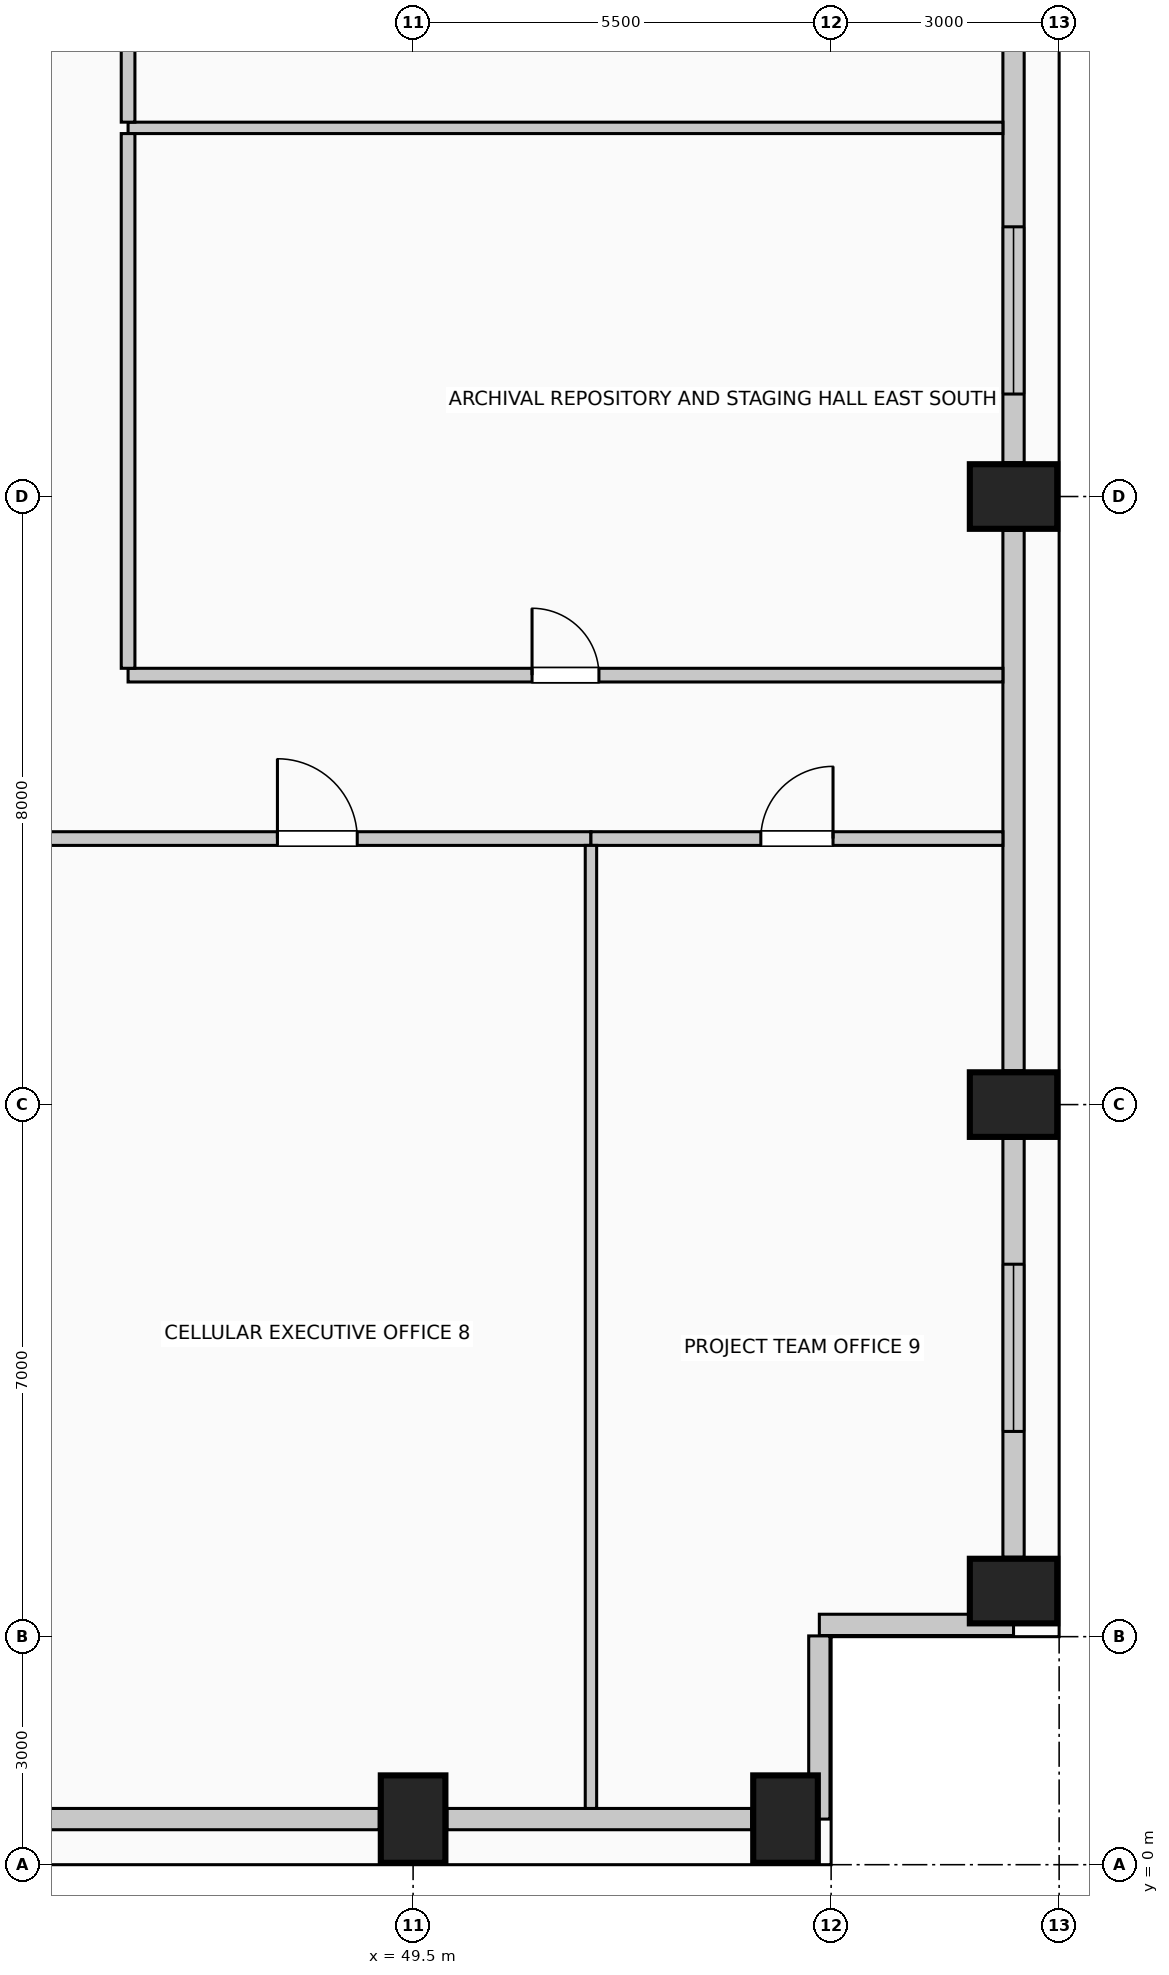
"""IFC4 building model, lengths in metres.
Left out: names, types, materials, properties, quantities, classifications, styles, units other than length and angle.
Written with IfcOpenShell. Run it as: python <this file> out.ifc"""

import sys

from ifc_helpers import new_model, si_unit, direction, frame, frame_2d, origin, origin_2d, place, context, subcontext, project, spatial, rectangle, extrude, element, fill, save


model = new_model("IFC4")
c1 = context("Model", 3, precision=1e-05, world=origin(), true_north=direction((0.0, 1.0)))
c2 = subcontext(c1, "Body", "Model", "MODEL_VIEW")
j1 = project(units=[si_unit("LENGTHUNIT", "METRE"), si_unit("PLANEANGLEUNIT", "RADIAN")], contexts=[c1])
p1 = place(None, origin())
s1 = spatial("IfcSite", under=j1, at=p1, CompositionType="ELEMENT")
p2 = place(p1, origin())
s2 = spatial("IfcBuilding", under=s1, at=p2, CompositionType="ELEMENT")
p3 = place(p2, frame((0.0, 0.0, 148.6)))
s3 = spatial("IfcBuildingStorey", under=s2, at=p3, CompositionType="ELEMENT", Elevation=148.6)
for number, where, z_axis, x_axis in (
    (1, (49.5, 0.6, 0.0), (0.0, 0.0, 1.0), (1.0, 0.0, 0.0)),
    (2, (54.4, 0.6, 0.0), (0.0, 0.0, 1.0), (1.0, 0.0, 0.0)),
    (3, (57.4, 3.6, 0.0), (0.0, 0.0, 1.0), (0.0, 1.0, 0.0)),
    (4, (57.4, 10.0, 0.0), (0.0, 0.0, 1.0), (0.0, 1.0, 0.0)),
    (5, (57.4, 18.0, 0.0), (0.0, 0.0, 1.0), (0.0, 1.0, 0.0)),
):
    element("IfcColumn", number, at=place(p3, frame(where, z_axis=z_axis, x_axis=x_axis)), inside=s3, PredefinedType="COLUMN", context=c2, shape_type="SweptSolid", body=[
        extrude(rectangle(XDim=0.85, YDim=1.15, at=origin_2d()), origin(), (0.0, 0.0, 1.0), 4.0),
    ])
p4 = place(p3, frame((49.055, 0.6, 0.0), z_axis=(0.0, 0.0, 1.0), x_axis=(-1.0, 0.0, 0.0)))
e6 = element("IfcWall", 6, at=p4, inside=s3, PredefinedType="SOLIDWALL", context=c2, shape_type="SweptSolid", body=[
    extrude(rectangle(XDim=4.61, YDim=0.28, at=frame_2d((2.305, 0.0))), origin(), (0.0, 0.0, 1.0), 2.875),
])
p5 = place(p3, frame((53.955, 0.6, 0.0), z_axis=(0.0, 0.0, 1.0), x_axis=(-1.0, 0.0, 0.0)))
e7 = element("IfcWall", 7, at=p5, inside=s3, PredefinedType="SOLIDWALL", context=c2, shape_type="SweptSolid", body=[
    extrude(rectangle(XDim=4.01, YDim=0.28, at=frame_2d((2.005, 0.0))), origin(), (0.0, 0.0, 1.0), 2.875),
])
p6 = place(p3, frame((57.4, 9.555, 0.0), z_axis=(0.0, 0.0, 1.0), x_axis=(0.0, -1.0, 0.0)))
e8 = element("IfcWall", 8, at=p6, inside=s3, PredefinedType="SOLIDWALL", context=c2, shape_type="SweptSolid", body=[
    extrude(rectangle(XDim=5.51, YDim=0.28, at=frame_2d((2.755, 0.0))), origin(), (0.0, 0.0, 1.0), 2.875),
])
p7 = place(p6, frame((1.655, 0.0, 0.5)))
e9 = element("IfcOpeningElement", 9, at=p7, cuts=e8, PredefinedType="OPENING", context=c2, shape_type="SweptSolid", body=[
    extrude(rectangle(XDim=2.2, YDim=1.95, at=frame_2d((1.1, 0.975))), frame((0.0, 0.15, 0.0), z_axis=(0.0, -1.0, 0.0), x_axis=(1.0, 0.0, 0.0)), (0.0, 0.0, 1.0), 0.3),
])
p8 = place(p3, frame((57.4, 17.555, 0.0), z_axis=(0.0, 0.0, 1.0), x_axis=(0.0, -1.0, 0.0)))
e10 = element("IfcWall", 10, at=p8, inside=s3, PredefinedType="SOLIDWALL", context=c2, shape_type="SweptSolid", body=[
    extrude(rectangle(XDim=7.11, YDim=0.28, at=frame_2d((3.555, 0.0))), origin(), (0.0, 0.0, 1.0), 2.875),
])
p9 = place(p3, frame((57.4, 25.555, 0.0), z_axis=(0.0, 0.0, 1.0), x_axis=(0.0, -1.0, 0.0)))
e11 = element("IfcWall", 11, at=p9, inside=s3, PredefinedType="SOLIDWALL", context=c2, shape_type="SweptSolid", body=[
    extrude(rectangle(XDim=7.11, YDim=0.28, at=frame_2d((3.555, 0.0))), origin(), (0.0, 0.0, 1.0), 2.875),
])
p10 = place(p9, frame((4.007, 0.0, 0.5)))
e12 = element("IfcOpeningElement", 12, at=p10, cuts=e11, PredefinedType="OPENING", context=c2, shape_type="SweptSolid", body=[
    extrude(rectangle(XDim=2.2, YDim=1.95, at=frame_2d((1.1, 0.975))), frame((0.0, 0.15, 0.0), z_axis=(0.0, -1.0, 0.0), x_axis=(1.0, 0.0, 0.0)), (0.0, 0.0, 1.0), 0.3),
])
p11 = place(p3, frame((57.4, 3.155, 0.0), z_axis=(0.0, 0.0, 1.0), x_axis=(-1.0, 0.0, 0.0)))
e13 = element("IfcWall", 13, at=p11, inside=s3, PredefinedType="SOLIDWALL", context=c2, shape_type="SweptSolid", body=[
    extrude(rectangle(XDim=2.555, YDim=0.28, at=frame_2d((1.277, 0.0))), origin(), (0.0, 0.0, 1.0), 3.725),
])
p12 = place(p3, frame((54.845, 3.01, 0.0), z_axis=(0.0, 0.0, 1.0), x_axis=(0.0, -1.0, 0.0)))
e14 = element("IfcWall", 14, at=p12, inside=s3, PredefinedType="SOLIDWALL", context=c2, shape_type="SweptSolid", body=[
    extrude(rectangle(XDim=2.41, YDim=0.28, at=frame_2d((1.205, 0.0))), origin(), (0.0, 0.0, 1.0), 3.725),
])
p13 = place(p3, frame((44.64, 13.5, 0.0), z_axis=(0.0, 0.0, 1.0), x_axis=(1.0, 0.0, 0.0)))
e15 = element("IfcWall", 15, at=p13, inside=s3, PredefinedType="PARTITIONING", context=c2, shape_type="SweptSolid", body=[
    extrude(rectangle(XDim=7.2, YDim=0.18, at=frame_2d((3.6, 0.0))), origin(), (0.0, 0.0, 1.0), 3.725),
])
p14 = place(p13, frame((3.075, 0.0, 0.0)))
e16 = element("IfcOpeningElement", 16, at=p14, cuts=e15, PredefinedType="OPENING", context=c2, shape_type="SweptSolid", body=[
    extrude(rectangle(XDim=1.05, YDim=2.15, at=frame_2d((0.525, 1.075))), frame((0.0, 0.1, 0.0), z_axis=(0.0, -1.0, 0.0), x_axis=(1.0, 0.0, 0.0)), (0.0, 0.0, 1.0), 0.2),
])
p15 = place(p3, frame((51.84, 13.5, 0.0), z_axis=(0.0, 0.0, 1.0), x_axis=(1.0, 0.0, 0.0)))
e17 = element("IfcWall", 17, at=p15, inside=s3, PredefinedType="PARTITIONING", context=c2, shape_type="SweptSolid", body=[
    extrude(rectangle(XDim=5.42, YDim=0.18, at=frame_2d((2.71, 0.0))), origin(), (0.0, 0.0, 1.0), 3.725),
])
p16 = place(p15, frame((2.235, 0.0, 0.0)))
e18 = element("IfcOpeningElement", 18, at=p16, cuts=e17, PredefinedType="OPENING", context=c2, shape_type="SweptSolid", body=[
    extrude(rectangle(XDim=0.95, YDim=2.15, at=frame_2d((0.475, 1.075))), frame((0.0, 0.1, 0.0), z_axis=(0.0, -1.0, 0.0), x_axis=(1.0, 0.0, 0.0)), (0.0, 0.0, 1.0), 0.2),
])
p17 = place(p3, frame((45.75, 15.65, 0.0), z_axis=(0.0, 0.0, 1.0), x_axis=(1.0, 0.0, 0.0)))
e19 = element("IfcWall", 19, at=p17, inside=s3, PredefinedType="PARTITIONING", context=c2, shape_type="SweptSolid", body=[
    extrude(rectangle(XDim=11.51, YDim=0.18, at=frame_2d((5.755, 0.0))), origin(), (0.0, 0.0, 1.0), 3.725),
])
p18 = place(p17, frame((5.315, 0.0, 0.0)))
e20 = element("IfcOpeningElement", 20, at=p18, cuts=e19, PredefinedType="OPENING", context=c2, shape_type="SweptSolid", body=[
    extrude(rectangle(XDim=0.88, YDim=2.1, at=frame_2d((0.44, 1.05))), frame((0.0, 0.1, 0.0), z_axis=(0.0, -1.0, 0.0), x_axis=(1.0, 0.0, 0.0)), (0.0, 0.0, 1.0), 0.2),
])
p19 = place(p3, frame((45.75, 22.85, 0.0), z_axis=(0.0, 0.0, 1.0), x_axis=(1.0, 0.0, 0.0)))
e21 = element("IfcWall", 21, at=p19, inside=s3, PredefinedType="PARTITIONING", context=c2, shape_type="SweptSolid", body=[
    extrude(rectangle(XDim=11.51, YDim=0.15, at=frame_2d((5.755, 0.0))), origin(), (0.0, 0.0, 1.0), 3.725),
])
p20 = place(p3, frame((45.75, 15.74, 0.0), z_axis=(0.0, 0.0, 1.0), x_axis=(0.0, 1.0, 0.0)))
e22 = element("IfcWall", 22, at=p20, inside=s3, PredefinedType="PARTITIONING", context=c2, shape_type="SweptSolid", body=[
    extrude(rectangle(XDim=7.035, YDim=0.18, at=frame_2d((3.518, 0.0))), origin(), (0.0, 0.0, 1.0), 3.725),
])
p21 = place(p3, frame((45.75, 22.925, 0.0), z_axis=(0.0, 0.0, 1.0), x_axis=(0.0, 1.0, 0.0)))
e23 = element("IfcWall", 23, at=p21, inside=s3, PredefinedType="PARTITIONING", context=c2, shape_type="SweptSolid", body=[
    extrude(rectangle(XDim=9.35, YDim=0.18, at=frame_2d((4.675, 0.0))), origin(), (0.0, 0.0, 1.0), 3.725),
])
p22 = place(p3, frame((51.84, 0.74, 0.0), z_axis=(0.0, 0.0, 1.0), x_axis=(0.0, 1.0, 0.0)))
e24 = element("IfcWall", 24, at=p22, inside=s3, PredefinedType="PARTITIONING", context=c2, shape_type="SweptSolid", body=[
    extrude(rectangle(XDim=12.67, YDim=0.15, at=frame_2d((6.335, 0.0))), origin(), (0.0, 0.0, 1.0), 3.725),
])
p23 = place(p7, origin())
e25 = element("IfcWindow", 25, at=p23, inside=s3, PartitioningType="SINGLE_PANEL", PredefinedType="WINDOW", context=c2, shape_type="SweptSolid", body=[
    extrude(rectangle(XDim=2.2, YDim=1.95, at=frame_2d((1.1, 0.975))), frame((0.0, 0.03, 0.0), z_axis=(0.0, -1.0, 0.0), x_axis=(1.0, 0.0, 0.0)), (0.0, 0.0, 1.0), 0.06),
])
fill(e9, e25)
p24 = place(p10, origin())
e26 = element("IfcWindow", 26, at=p24, inside=s3, PartitioningType="SINGLE_PANEL", PredefinedType="WINDOW", context=c2, shape_type="SweptSolid", body=[
    extrude(rectangle(XDim=2.2, YDim=1.95, at=frame_2d((1.1, 0.975))), frame((0.0, 0.03, 0.0), z_axis=(0.0, -1.0, 0.0), x_axis=(1.0, 0.0, 0.0)), (0.0, 0.0, 1.0), 0.06),
])
fill(e12, e26)
p25 = place(p14, origin())
e27 = element("IfcDoor", 27, at=p25, inside=s3, OperationType="SINGLE_SWING_LEFT", PredefinedType="DOOR", context=c2, shape_type="SweptSolid", body=[
    extrude(rectangle(XDim=1.05, YDim=2.15, at=frame_2d((0.525, 1.075))), frame((0.0, 0.025, 0.0), z_axis=(0.0, -1.0, 0.0), x_axis=(1.0, 0.0, 0.0)), (0.0, 0.0, 1.0), 0.05),
])
fill(e16, e27)
p26 = place(p16, origin())
e28 = element("IfcDoor", 28, at=p26, inside=s3, OperationType="SINGLE_SWING_RIGHT", PredefinedType="DOOR", context=c2, shape_type="SweptSolid", body=[
    extrude(rectangle(XDim=0.95, YDim=2.15, at=frame_2d((0.475, 1.075))), frame((0.0, 0.025, 0.0), z_axis=(0.0, -1.0, 0.0), x_axis=(1.0, 0.0, 0.0)), (0.0, 0.0, 1.0), 0.05),
])
fill(e18, e28)
p27 = place(p18, origin())
e29 = element("IfcDoor", 29, at=p27, inside=s3, OperationType="SINGLE_SWING_LEFT", PredefinedType="DOOR", context=c2, shape_type="SweptSolid", body=[
    extrude(rectangle(XDim=0.88, YDim=2.1, at=frame_2d((0.44, 1.05))), frame((0.0, 0.025, 0.0), z_axis=(0.0, -1.0, 0.0), x_axis=(1.0, 0.0, 0.0)), (0.0, 0.0, 1.0), 0.05),
])
fill(e20, e29)
save(model, sys.argv[1])
